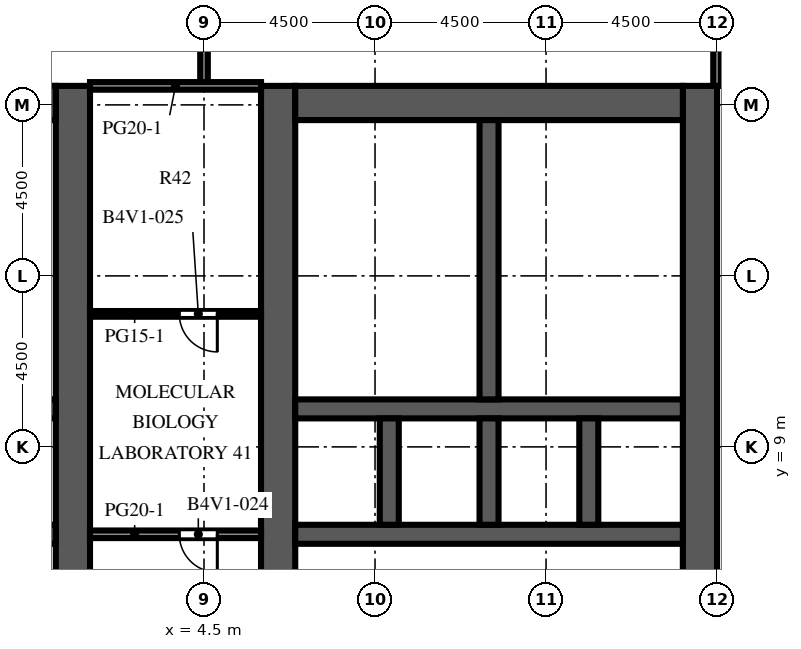
"""IFC4 building model, lengths in metres.
Left out: names, types, materials, properties, quantities, classifications, styles, units other than length and angle.
Written with IfcOpenShell. Run it as: python <this file> out.ifc"""

import sys

from ifc_helpers import new_model, si_unit, direction, frame, frame_2d, origin, place, context, subcontext, project, spatial, rectangle, extrude, element, fill, save


model = new_model("IFC4")
c1 = context("Model", 3, precision=1e-05, world=origin(), true_north=direction((0.0, 1.0)))
c2 = subcontext(c1, "Body", "Model", "MODEL_VIEW")
j1 = project(units=[si_unit("LENGTHUNIT", "METRE"), si_unit("PLANEANGLEUNIT", "RADIAN")], contexts=[c1])
p1 = place(None, origin())
s1 = spatial("IfcSite", under=j1, at=p1, CompositionType="ELEMENT")
p2 = place(p1, origin())
s2 = spatial("IfcBuilding", under=s1, at=p2, CompositionType="ELEMENT")
p3 = place(p2, frame((0.0, 0.0, 133.1)))
s3 = spatial("IfcBuildingStorey", under=s2, at=p3, CompositionType="ELEMENT", Elevation=133.1)
p4 = place(p3, frame((1.05, -9.0, 0.0), z_axis=(0.0, 0.0, 1.0), x_axis=(0.0, 1.0, 0.0)))
e1 = element("IfcWall", 1, at=p4, inside=s3, PredefinedType="SHEAR", context=c2, shape_type="SweptSolid", body=[
    extrude(rectangle(XDim=27.5, YDim=0.9, at=frame_2d((13.75, 0.0))), origin(), (0.0, 0.0, 1.0), 4.1),
])
p5 = place(p4, frame((12.55, 0.0, 0.0)))
e2 = element("IfcOpeningElement", 2, at=p5, cuts=e1, PredefinedType="OPENING", context=c2, shape_type="SweptSolid", body=[
    extrude(rectangle(XDim=2.4, YDim=2.4, at=frame_2d((1.2, 1.2))), frame((0.0, 0.46, 0.0), z_axis=(0.0, -1.0, 0.0), x_axis=(1.0, 0.0, 0.0)), (0.0, 0.0, 1.0), 0.92),
])
p6 = place(p4, frame((3.975, 0.0, 0.0)))
e3 = element("IfcOpeningElement", 3, at=p6, cuts=e1, PredefinedType="OPENING", context=c2, shape_type="SweptSolid", body=[
    extrude(rectangle(XDim=1.2, YDim=2.1, at=frame_2d((0.6, 1.05))), frame((0.0, 0.46, 0.0), z_axis=(0.0, -1.0, 0.0), x_axis=(1.0, 0.0, 0.0)), (0.0, 0.0, 1.0), 0.92),
])
p7 = place(p4, frame((22.325, 0.0, 0.0)))
e4 = element("IfcOpeningElement", 4, at=p7, cuts=e1, PredefinedType="OPENING", context=c2, shape_type="SweptSolid", body=[
    extrude(rectangle(XDim=1.2, YDim=2.1, at=frame_2d((0.6, 1.05))), frame((0.0, 0.46, 0.0), z_axis=(0.0, -1.0, 0.0), x_axis=(1.0, 0.0, 0.0)), (0.0, 0.0, 1.0), 0.92),
])
p8 = place(p3, frame((-9.6, 18.05, 0.0), z_axis=(0.0, 0.0, 1.0), x_axis=(1.0, 0.0, 0.0)))
e5 = element("IfcWall", 5, at=p8, inside=s3, PredefinedType="SHEAR", context=c2, shape_type="SweptSolid", body=[
    extrude(rectangle(XDim=10.2, YDim=0.9, at=frame_2d((5.1, 0.0))), origin(), (0.0, 0.0, 1.0), 4.1),
])
p9 = place(p3, frame((-9.6, 6.7, 0.0), z_axis=(0.0, 0.0, 1.0), x_axis=(1.0, 0.0, 0.0)))
e6 = element("IfcWall", 6, at=p9, inside=s3, PredefinedType="SHEAR", context=c2, shape_type="SweptSolid", body=[
    extrude(rectangle(XDim=10.2, YDim=0.5, at=frame_2d((5.1, 0.0))), origin(), (0.0, 0.0, 1.0), 4.1),
])
p10 = place(p9, frame((0.562, 0.0, 0.0)))
e7 = element("IfcOpeningElement", 7, at=p10, cuts=e6, PredefinedType="OPENING", context=c2, shape_type="SweptSolid", body=[
    extrude(rectangle(XDim=1.1, YDim=2.1, at=frame_2d((0.55, 1.05))), frame((0.0, 0.26, 0.0), z_axis=(0.0, -1.0, 0.0), x_axis=(1.0, 0.0, 0.0)), (0.0, 0.0, 1.0), 0.52),
])
p11 = place(p9, frame((3.288, 0.0, 0.0)))
e8 = element("IfcOpeningElement", 8, at=p11, cuts=e6, PredefinedType="OPENING", context=c2, shape_type="SweptSolid", body=[
    extrude(rectangle(XDim=1.0, YDim=2.1, at=frame_2d((0.5, 1.05))), frame((0.0, 0.26, 0.0), z_axis=(0.0, -1.0, 0.0), x_axis=(1.0, 0.0, 0.0)), (0.0, 0.0, 1.0), 0.52),
])
p12 = place(p9, frame((5.913, 0.0, 0.0)))
e9 = element("IfcOpeningElement", 9, at=p12, cuts=e6, PredefinedType="OPENING", context=c2, shape_type="SweptSolid", body=[
    extrude(rectangle(XDim=1.0, YDim=2.1, at=frame_2d((0.5, 1.05))), frame((0.0, 0.26, 0.0), z_axis=(0.0, -1.0, 0.0), x_axis=(1.0, 0.0, 0.0)), (0.0, 0.0, 1.0), 0.52),
])
p13 = place(p9, frame((8.587, 0.0, 0.0)))
e10 = element("IfcOpeningElement", 10, at=p13, cuts=e6, PredefinedType="OPENING", context=c2, shape_type="SweptSolid", body=[
    extrude(rectangle(XDim=1.0, YDim=2.1, at=frame_2d((0.5, 1.05))), frame((0.0, 0.26, 0.0), z_axis=(0.0, -1.0, 0.0), x_axis=(1.0, 0.0, 0.0)), (0.0, 0.0, 1.0), 0.52),
])
p14 = place(p3, frame((-9.6, 10.0, 0.0), z_axis=(0.0, 0.0, 1.0), x_axis=(1.0, 0.0, 0.0)))
e11 = element("IfcWall", 11, at=p14, inside=s3, PredefinedType="SHEAR", context=c2, shape_type="SweptSolid", body=[
    extrude(rectangle(XDim=10.2, YDim=0.5, at=frame_2d((5.1, 0.0))), origin(), (0.0, 0.0, 1.0), 4.1),
])
p15 = place(p3, frame((6.45, -9.0, 0.0), z_axis=(0.0, 0.0, 1.0), x_axis=(0.0, 1.0, 0.0)))
e12 = element("IfcWall", 12, at=p15, inside=s3, PredefinedType="SHEAR", context=c2, shape_type="SweptSolid", body=[
    extrude(rectangle(XDim=27.5, YDim=0.9, at=frame_2d((13.75, 0.0))), origin(), (0.0, 0.0, 1.0), 4.1),
])
p16 = place(p15, frame((12.55, 0.0, 0.0)))
e13 = element("IfcOpeningElement", 13, at=p16, cuts=e12, PredefinedType="OPENING", context=c2, shape_type="SweptSolid", body=[
    extrude(rectangle(XDim=2.4, YDim=2.4, at=frame_2d((1.2, 1.2))), frame((0.0, 0.46, 0.0), z_axis=(0.0, -1.0, 0.0), x_axis=(1.0, 0.0, 0.0)), (0.0, 0.0, 1.0), 0.92),
])
p17 = place(p15, frame((3.975, 0.0, 0.0)))
e14 = element("IfcOpeningElement", 14, at=p17, cuts=e12, PredefinedType="OPENING", context=c2, shape_type="SweptSolid", body=[
    extrude(rectangle(XDim=1.2, YDim=2.1, at=frame_2d((0.6, 1.05))), frame((0.0, 0.46, 0.0), z_axis=(0.0, -1.0, 0.0), x_axis=(1.0, 0.0, 0.0)), (0.0, 0.0, 1.0), 0.92),
])
p18 = place(p15, frame((22.325, 0.0, 0.0)))
e15 = element("IfcOpeningElement", 15, at=p18, cuts=e12, PredefinedType="OPENING", context=c2, shape_type="SweptSolid", body=[
    extrude(rectangle(XDim=1.2, YDim=2.1, at=frame_2d((0.6, 1.05))), frame((0.0, 0.46, 0.0), z_axis=(0.0, -1.0, 0.0), x_axis=(1.0, 0.0, 0.0)), (0.0, 0.0, 1.0), 0.92),
])
p19 = place(p3, frame((17.55, -9.0, 0.0), z_axis=(0.0, 0.0, 1.0), x_axis=(0.0, 1.0, 0.0)))
e16 = element("IfcWall", 16, at=p19, inside=s3, PredefinedType="SHEAR", context=c2, shape_type="SweptSolid", body=[
    extrude(rectangle(XDim=27.5, YDim=0.9, at=frame_2d((13.75, 0.0))), origin(), (0.0, 0.0, 1.0), 4.1),
])
p20 = place(p19, frame((12.55, 0.0, 0.0)))
e17 = element("IfcOpeningElement", 17, at=p20, cuts=e16, PredefinedType="OPENING", context=c2, shape_type="SweptSolid", body=[
    extrude(rectangle(XDim=2.4, YDim=2.4, at=frame_2d((1.2, 1.2))), frame((0.0, 0.46, 0.0), z_axis=(0.0, -1.0, 0.0), x_axis=(1.0, 0.0, 0.0)), (0.0, 0.0, 1.0), 0.92),
])
p21 = place(p19, frame((6.825, 0.0, 0.0)))
e18 = element("IfcOpeningElement", 18, at=p21, cuts=e16, PredefinedType="OPENING", context=c2, shape_type="SweptSolid", body=[
    extrude(rectangle(XDim=1.2, YDim=2.1, at=frame_2d((0.6, 1.05))), frame((0.0, 0.46, 0.0), z_axis=(0.0, -1.0, 0.0), x_axis=(1.0, 0.0, 0.0)), (0.0, 0.0, 1.0), 0.92),
])
p22 = place(p19, frame((19.475, 0.0, 0.0)))
e19 = element("IfcOpeningElement", 19, at=p22, cuts=e16, PredefinedType="OPENING", context=c2, shape_type="SweptSolid", body=[
    extrude(rectangle(XDim=1.2, YDim=2.1, at=frame_2d((0.6, 1.05))), frame((0.0, 0.46, 0.0), z_axis=(0.0, -1.0, 0.0), x_axis=(1.0, 0.0, 0.0)), (0.0, 0.0, 1.0), 0.92),
])
p23 = place(p3, frame((6.9, 18.05, 0.0), z_axis=(0.0, 0.0, 1.0), x_axis=(1.0, 0.0, 0.0)))
e20 = element("IfcWall", 20, at=p23, inside=s3, PredefinedType="SHEAR", context=c2, shape_type="SweptSolid", body=[
    extrude(rectangle(XDim=10.2, YDim=0.9, at=frame_2d((5.1, 0.0))), origin(), (0.0, 0.0, 1.0), 4.1),
])
p24 = place(p3, frame((6.9, 6.7, 0.0), z_axis=(0.0, 0.0, 1.0), x_axis=(1.0, 0.0, 0.0)))
e21 = element("IfcWall", 21, at=p24, inside=s3, PredefinedType="SHEAR", context=c2, shape_type="SweptSolid", body=[
    extrude(rectangle(XDim=10.2, YDim=0.5, at=frame_2d((5.1, 0.0))), origin(), (0.0, 0.0, 1.0), 4.1),
])
p25 = place(p24, frame((0.562, 0.0, 0.0)))
e22 = element("IfcOpeningElement", 22, at=p25, cuts=e21, PredefinedType="OPENING", context=c2, shape_type="SweptSolid", body=[
    extrude(rectangle(XDim=1.1, YDim=2.1, at=frame_2d((0.55, 1.05))), frame((0.0, 0.26, 0.0), z_axis=(0.0, -1.0, 0.0), x_axis=(1.0, 0.0, 0.0)), (0.0, 0.0, 1.0), 0.52),
])
p26 = place(p24, frame((3.288, 0.0, 0.0)))
e23 = element("IfcOpeningElement", 23, at=p26, cuts=e21, PredefinedType="OPENING", context=c2, shape_type="SweptSolid", body=[
    extrude(rectangle(XDim=1.0, YDim=2.1, at=frame_2d((0.5, 1.05))), frame((0.0, 0.26, 0.0), z_axis=(0.0, -1.0, 0.0), x_axis=(1.0, 0.0, 0.0)), (0.0, 0.0, 1.0), 0.52),
])
p27 = place(p24, frame((5.913, 0.0, 0.0)))
e24 = element("IfcOpeningElement", 24, at=p27, cuts=e21, PredefinedType="OPENING", context=c2, shape_type="SweptSolid", body=[
    extrude(rectangle(XDim=1.0, YDim=2.1, at=frame_2d((0.5, 1.05))), frame((0.0, 0.26, 0.0), z_axis=(0.0, -1.0, 0.0), x_axis=(1.0, 0.0, 0.0)), (0.0, 0.0, 1.0), 0.52),
])
p28 = place(p24, frame((8.587, 0.0, 0.0)))
e25 = element("IfcOpeningElement", 25, at=p28, cuts=e21, PredefinedType="OPENING", context=c2, shape_type="SweptSolid", body=[
    extrude(rectangle(XDim=1.0, YDim=2.1, at=frame_2d((0.5, 1.05))), frame((0.0, 0.26, 0.0), z_axis=(0.0, -1.0, 0.0), x_axis=(1.0, 0.0, 0.0)), (0.0, 0.0, 1.0), 0.52),
])
p29 = place(p3, frame((6.9, 10.0, 0.0), z_axis=(0.0, 0.0, 1.0), x_axis=(1.0, 0.0, 0.0)))
e26 = element("IfcWall", 26, at=p29, inside=s3, PredefinedType="SHEAR", context=c2, shape_type="SweptSolid", body=[
    extrude(rectangle(XDim=10.2, YDim=0.5, at=frame_2d((5.1, 0.0))), origin(), (0.0, 0.0, 1.0), 4.1),
])
for number, where, z_axis, x_axis in (
    (27, (9.375, 6.95, 0.0), (0.0, 0.0, 1.0), (0.0, 1.0, 0.0)),
    (28, (12.0, 6.95, 0.0), (0.0, 0.0, 1.0), (0.0, 1.0, 0.0)),
    (29, (14.625, 6.95, 0.0), (0.0, 0.0, 1.0), (0.0, 1.0, 0.0)),
):
    element("IfcWall", number, at=place(p3, frame(where, z_axis=z_axis, x_axis=x_axis)), inside=s3, PredefinedType="SHEAR", context=c2, shape_type="SweptSolid", body=[
        extrude(rectangle(XDim=2.8, YDim=0.5, at=frame_2d((1.4, 0.0))), origin(), (0.0, 0.0, 1.0), 4.1),
    ])
p30 = place(p3, frame((12.0, 10.25, 0.0), z_axis=(0.0, 0.0, 1.0), x_axis=(0.0, 1.0, 0.0)))
e30 = element("IfcWall", 30, at=p30, inside=s3, PredefinedType="SHEAR", context=c2, shape_type="SweptSolid", body=[
    extrude(rectangle(XDim=7.35, YDim=0.5, at=frame_2d((3.675, 0.0))), origin(), (0.0, 0.0, 1.0), 4.1),
])
p31 = place(p3, frame((8.3, 10.25, 0.0), z_axis=(0.0, 0.0, 1.0), x_axis=(0.0, 1.0, 0.0)))
e31 = element("IfcWall", 31, at=p31, inside=s3, PredefinedType="PARTITIONING", context=c2, shape_type="SweptSolid", body=[
    extrude(rectangle(XDim=2.205, YDim=0.1, at=frame_2d((1.103, 0.0))), origin(), (0.0, 0.0, 1.0), 3.65),
])
p32 = place(p31, frame((0.603, 0.0, 0.0)))
e32 = element("IfcOpeningElement", 32, at=p32, cuts=e31, PredefinedType="OPENING", context=c2, shape_type="SweptSolid", body=[
    extrude(rectangle(XDim=1.0, YDim=2.1, at=frame_2d((0.5, 1.05))), frame((0.0, 0.06, 0.0), z_axis=(0.0, -1.0, 0.0), x_axis=(1.0, 0.0, 0.0)), (0.0, 0.0, 1.0), 0.12),
])
p33 = place(p3, frame((8.3, 12.455, 0.0), z_axis=(0.0, 0.0, 1.0), x_axis=(0.0, 1.0, 0.0)))
e33 = element("IfcWall", 33, at=p33, inside=s3, PredefinedType="PARTITIONING", context=c2, shape_type="SweptSolid", body=[
    extrude(rectangle(XDim=2.352, YDim=0.1, at=frame_2d((1.176, 0.0))), origin(), (0.0, 0.0, 1.0), 3.65),
])
p34 = place(p33, frame((0.676, 0.0, 0.0)))
e34 = element("IfcOpeningElement", 34, at=p34, cuts=e33, PredefinedType="OPENING", context=c2, shape_type="SweptSolid", body=[
    extrude(rectangle(XDim=1.0, YDim=2.1, at=frame_2d((0.5, 1.05))), frame((0.0, 0.06, 0.0), z_axis=(0.0, -1.0, 0.0), x_axis=(1.0, 0.0, 0.0)), (0.0, 0.0, 1.0), 0.12),
])
p35 = place(p3, frame((8.3, 14.807, 0.0), z_axis=(0.0, 0.0, 1.0), x_axis=(0.0, 1.0, 0.0)))
e35 = element("IfcWall", 35, at=p35, inside=s3, PredefinedType="PARTITIONING", context=c2, shape_type="SweptSolid", body=[
    extrude(rectangle(XDim=2.793, YDim=0.1, at=frame_2d((1.396, 0.0))), origin(), (0.0, 0.0, 1.0), 3.65),
])
p36 = place(p35, frame((0.896, 0.0, 0.0)))
e36 = element("IfcOpeningElement", 36, at=p36, cuts=e35, PredefinedType="OPENING", context=c2, shape_type="SweptSolid", body=[
    extrude(rectangle(XDim=1.0, YDim=2.1, at=frame_2d((0.5, 1.05))), frame((0.0, 0.06, 0.0), z_axis=(0.0, -1.0, 0.0), x_axis=(1.0, 0.0, 0.0)), (0.0, 0.0, 1.0), 0.12),
])
for number, where, z_axis, x_axis in (
    (37, (8.3, 12.455, 0.0), (0.0, 0.0, 1.0), (1.0, 0.0, 0.0)),
    (38, (8.3, 14.807, 0.0), (0.0, 0.0, 1.0), (1.0, 0.0, 0.0)),
):
    element("IfcWall", number, at=place(p3, frame(where, z_axis=z_axis, x_axis=x_axis)), inside=s3, PredefinedType="PARTITIONING", context=c2, shape_type="SweptSolid", body=[
        extrude(rectangle(XDim=3.45, YDim=0.1, at=frame_2d((1.725, 0.0))), origin(), (0.0, 0.0, 1.0), 3.65),
    ])
p37 = place(p3, frame((4.5, 18.5, 0.0), z_axis=(0.0, 0.0, 1.0), x_axis=(0.0, 1.0, 0.0)))
e39 = element("IfcWall", 39, at=p37, inside=s3, PredefinedType="PARTITIONING", context=c2, shape_type="SweptSolid", body=[
    extrude(rectangle(XDim=12.4, YDim=0.2, at=frame_2d((6.2, 0.0))), origin(), (0.0, 0.0, 1.0), 3.65),
])
p38 = place(p3, frame((18.0, 18.5, 0.0), z_axis=(0.0, 0.0, 1.0), x_axis=(0.0, 1.0, 0.0)))
e40 = element("IfcWall", 40, at=p38, inside=s3, PredefinedType="PARTITIONING", context=c2, shape_type="SweptSolid", body=[
    extrude(rectangle(XDim=3.3, YDim=0.2, at=frame_2d((1.65, 0.0))), origin(), (0.0, 0.0, 1.0), 3.65),
])
p39 = place(p3, frame((1.5, 6.7, 0.0), z_axis=(0.0, 0.0, 1.0), x_axis=(1.0, 0.0, 0.0)))
e41 = element("IfcWall", 41, at=p39, inside=s3, PredefinedType="PARTITIONING", context=c2, shape_type="SweptSolid", body=[
    extrude(rectangle(XDim=4.5, YDim=0.2, at=frame_2d((2.25, 0.0))), origin(), (0.0, 0.0, 1.0), 3.65),
])
p40 = place(p39, frame((2.35, 0.0, 0.0)))
e42 = element("IfcOpeningElement", 42, at=p40, cuts=e41, PredefinedType="OPENING", context=c2, shape_type="SweptSolid", body=[
    extrude(rectangle(XDim=1.0, YDim=2.1, at=frame_2d((0.5, 1.05))), frame((0.0, 0.11, 0.0), z_axis=(0.0, -1.0, 0.0), x_axis=(1.0, 0.0, 0.0)), (0.0, 0.0, 1.0), 0.22),
])
p41 = place(p3, frame((1.5, 12.5, 0.0), z_axis=(0.0, 0.0, 1.0), x_axis=(1.0, 0.0, 0.0)))
e43 = element("IfcWall", 43, at=p41, inside=s3, PredefinedType="PARTITIONING", context=c2, shape_type="SweptSolid", body=[
    extrude(rectangle(XDim=4.5, YDim=0.15, at=frame_2d((2.25, 0.0))), origin(), (0.0, 0.0, 1.0), 3.65),
])
p42 = place(p41, frame((2.35, 0.0, 0.0)))
e44 = element("IfcOpeningElement", 44, at=p42, cuts=e43, PredefinedType="OPENING", context=c2, shape_type="SweptSolid", body=[
    extrude(rectangle(XDim=1.0, YDim=2.1, at=frame_2d((0.5, 1.05))), frame((0.0, 0.085, 0.0), z_axis=(0.0, -1.0, 0.0), x_axis=(1.0, 0.0, 0.0)), (0.0, 0.0, 1.0), 0.17),
])
p43 = place(p3, frame((1.5, 18.5, 0.0), z_axis=(0.0, 0.0, 1.0), x_axis=(1.0, 0.0, 0.0)))
e45 = element("IfcWall", 45, at=p43, inside=s3, PredefinedType="PARTITIONING", context=c2, shape_type="SweptSolid", body=[
    extrude(rectangle(XDim=4.5, YDim=0.2, at=frame_2d((2.25, 0.0))), origin(), (0.0, 0.0, 1.0), 3.65),
])
p44 = place(p25, origin())
e46 = element("IfcDoor", 46, at=p44, inside=s3, OperationType="DOUBLE_DOOR_SLIDING", PredefinedType="DOOR", context=c2, shape_type="SweptSolid", body=[
    extrude(rectangle(XDim=1.1, YDim=2.1, at=frame_2d((0.55, 1.05))), frame((0.0, 0.025, 0.0), z_axis=(0.0, -1.0, 0.0), x_axis=(1.0, 0.0, 0.0)), (0.0, 0.0, 1.0), 0.05),
])
fill(e22, e46)
p45 = place(p5, origin())
e47 = element("IfcDoor", 47, at=p45, inside=s3, OperationType="DOUBLE_DOOR_DOUBLE_SWING", PredefinedType="DOOR", context=c2, shape_type="SweptSolid", body=[
    extrude(rectangle(XDim=2.4, YDim=2.4, at=frame_2d((1.2, 1.2))), frame((0.0, 0.025, 0.0), z_axis=(0.0, -1.0, 0.0), x_axis=(1.0, 0.0, 0.0)), (0.0, 0.0, 1.0), 0.05),
])
fill(e2, e47)
p46 = place(p16, origin())
e48 = element("IfcDoor", 48, at=p46, inside=s3, OperationType="DOUBLE_DOOR_DOUBLE_SWING", PredefinedType="DOOR", context=c2, shape_type="SweptSolid", body=[
    extrude(rectangle(XDim=2.4, YDim=2.4, at=frame_2d((1.2, 1.2))), frame((0.0, 0.025, 0.0), z_axis=(0.0, -1.0, 0.0), x_axis=(1.0, 0.0, 0.0)), (0.0, 0.0, 1.0), 0.05),
])
fill(e13, e48)
p47 = place(p20, origin())
e49 = element("IfcDoor", 49, at=p47, inside=s3, OperationType="DOUBLE_DOOR_DOUBLE_SWING", PredefinedType="DOOR", context=c2, shape_type="SweptSolid", body=[
    extrude(rectangle(XDim=2.4, YDim=2.4, at=frame_2d((1.2, 1.2))), frame((0.0, 0.025, 0.0), z_axis=(0.0, -1.0, 0.0), x_axis=(1.0, 0.0, 0.0)), (0.0, 0.0, 1.0), 0.05),
])
fill(e17, e49)
p48 = place(p22, frame((1.2, 0.0, 0.0), z_axis=(0.0, 0.0, 1.0), x_axis=(-1.0, 0.0, 0.0)))
e50 = element("IfcDoor", 50, at=p48, inside=s3, OperationType="SINGLE_SWING_LEFT", PredefinedType="DOOR", context=c2, shape_type="SweptSolid", body=[
    extrude(rectangle(XDim=1.2, YDim=2.1, at=frame_2d((0.6, 1.05))), frame((0.0, 0.025, 0.0), z_axis=(0.0, -1.0, 0.0), x_axis=(1.0, 0.0, 0.0)), (0.0, 0.0, 1.0), 0.05),
])
fill(e19, e50)
p49 = place(p7, origin())
e51 = element("IfcDoor", 51, at=p49, inside=s3, OperationType="SINGLE_SWING_LEFT", PredefinedType="DOOR", context=c2, shape_type="SweptSolid", body=[
    extrude(rectangle(XDim=1.2, YDim=2.1, at=frame_2d((0.6, 1.05))), frame((0.0, 0.425, 0.0), z_axis=(0.0, -1.0, 0.0), x_axis=(1.0, 0.0, 0.0)), (0.0, 0.0, 1.0), 0.05),
])
fill(e4, e51)
p50 = place(p26, origin())
e52 = element("IfcDoor", 52, at=p50, inside=s3, OperationType="SINGLE_SWING_RIGHT", PredefinedType="DOOR", context=c2, shape_type="SweptSolid", body=[
    extrude(rectangle(XDim=1.0, YDim=2.1, at=frame_2d((0.5, 1.05))), frame((0.0, 0.025, 0.0), z_axis=(0.0, -1.0, 0.0), x_axis=(1.0, 0.0, 0.0)), (0.0, 0.0, 1.0), 0.05),
])
fill(e23, e52)
p51 = place(p27, origin())
e53 = element("IfcDoor", 53, at=p51, inside=s3, OperationType="SINGLE_SWING_LEFT", PredefinedType="DOOR", context=c2, shape_type="SweptSolid", body=[
    extrude(rectangle(XDim=1.0, YDim=2.1, at=frame_2d((0.5, 1.05))), frame((0.0, 0.025, 0.0), z_axis=(0.0, -1.0, 0.0), x_axis=(1.0, 0.0, 0.0)), (0.0, 0.0, 1.0), 0.05),
])
fill(e24, e53)
p52 = place(p28, origin())
e54 = element("IfcDoor", 54, at=p52, inside=s3, OperationType="SINGLE_SWING_RIGHT", PredefinedType="DOOR", context=c2, shape_type="SweptSolid", body=[
    extrude(rectangle(XDim=1.0, YDim=2.1, at=frame_2d((0.5, 1.05))), frame((0.0, 0.025, 0.0), z_axis=(0.0, -1.0, 0.0), x_axis=(1.0, 0.0, 0.0)), (0.0, 0.0, 1.0), 0.05),
])
fill(e25, e54)
p53 = place(p18, origin())
e55 = element("IfcDoor", 55, at=p53, inside=s3, OperationType="SINGLE_SWING_RIGHT", PredefinedType="DOOR", context=c2, shape_type="SweptSolid", body=[
    extrude(rectangle(XDim=1.2, YDim=2.1, at=frame_2d((0.6, 1.05))), frame((0.0, -0.375, 0.0), z_axis=(0.0, -1.0, 0.0), x_axis=(1.0, 0.0, 0.0)), (0.0, 0.0, 1.0), 0.05),
])
fill(e15, e55)
p54 = place(p32, origin())
e56 = element("IfcDoor", 56, at=p54, inside=s3, OperationType="SINGLE_SWING_LEFT", PredefinedType="DOOR", context=c2, shape_type="SweptSolid", body=[
    extrude(rectangle(XDim=1.0, YDim=2.1, at=frame_2d((0.5, 1.05))), frame((0.0, 0.025, 0.0), z_axis=(0.0, -1.0, 0.0), x_axis=(1.0, 0.0, 0.0)), (0.0, 0.0, 1.0), 0.05),
])
fill(e32, e56)
p55 = place(p34, origin())
e57 = element("IfcDoor", 57, at=p55, inside=s3, OperationType="SINGLE_SWING_RIGHT", PredefinedType="DOOR", context=c2, shape_type="SweptSolid", body=[
    extrude(rectangle(XDim=1.0, YDim=2.1, at=frame_2d((0.5, 1.05))), frame((0.0, 0.025, 0.0), z_axis=(0.0, -1.0, 0.0), x_axis=(1.0, 0.0, 0.0)), (0.0, 0.0, 1.0), 0.05),
])
fill(e34, e57)
p56 = place(p36, origin())
e58 = element("IfcDoor", 58, at=p56, inside=s3, OperationType="SINGLE_SWING_LEFT", PredefinedType="DOOR", context=c2, shape_type="SweptSolid", body=[
    extrude(rectangle(XDim=1.0, YDim=2.1, at=frame_2d((0.5, 1.05))), frame((0.0, 0.025, 0.0), z_axis=(0.0, -1.0, 0.0), x_axis=(1.0, 0.0, 0.0)), (0.0, 0.0, 1.0), 0.05),
])
fill(e36, e58)
p57 = place(p40, origin())
e59 = element("IfcDoor", 59, at=p57, inside=s3, OperationType="SINGLE_SWING_RIGHT", PredefinedType="DOOR", context=c2, shape_type="SweptSolid", body=[
    extrude(rectangle(XDim=1.0, YDim=2.1, at=frame_2d((0.5, 1.05))), frame((0.0, 0.025, 0.0), z_axis=(0.0, -1.0, 0.0), x_axis=(1.0, 0.0, 0.0)), (0.0, 0.0, 1.0), 0.05),
])
fill(e42, e59)
p58 = place(p42, origin())
e60 = element("IfcDoor", 60, at=p58, inside=s3, OperationType="SINGLE_SWING_RIGHT", PredefinedType="DOOR", context=c2, shape_type="SweptSolid", body=[
    extrude(rectangle(XDim=1.0, YDim=2.1, at=frame_2d((0.5, 1.05))), frame((0.0, 0.025, 0.0), z_axis=(0.0, -1.0, 0.0), x_axis=(1.0, 0.0, 0.0)), (0.0, 0.0, 1.0), 0.05),
])
fill(e44, e60)
save(model, sys.argv[1])
